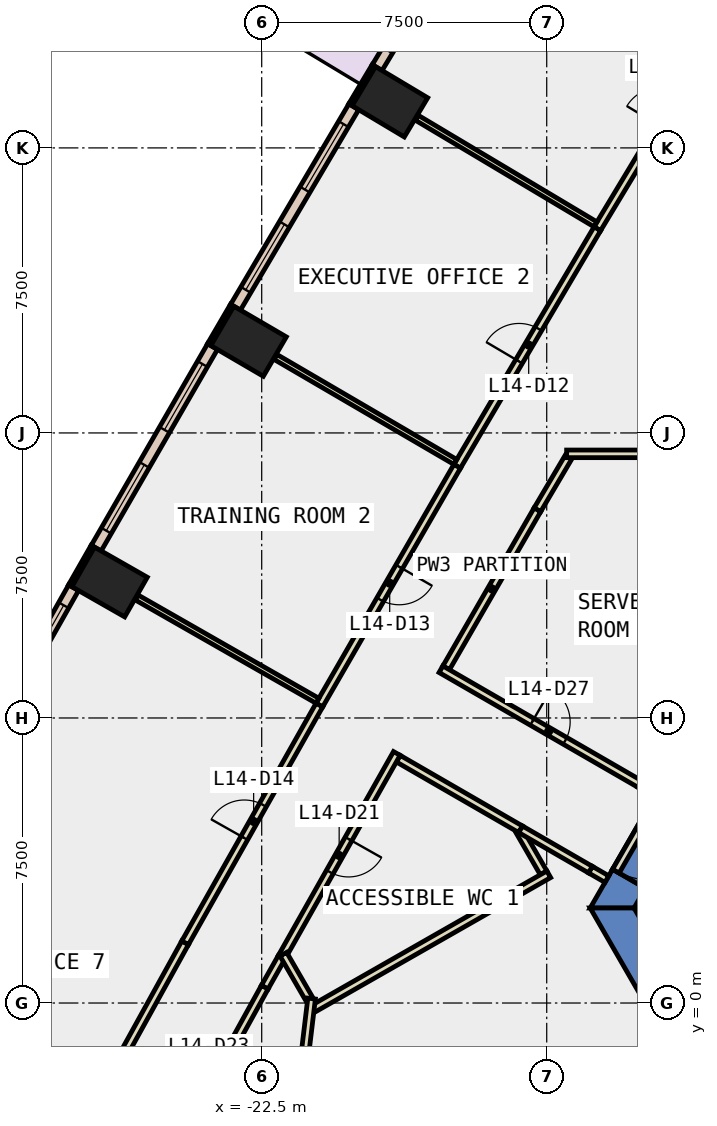
"""IFC4 building model, lengths in metres.
Left out: names, types, materials, properties, quantities, classifications, styles, units other than length and angle.
Written with IfcOpenShell. Run it as: python <this file> out.ifc"""

import sys

from ifc_helpers import new_model, si_unit, direction, frame, frame_2d, origin, origin_2d, place, context, subcontext, project, spatial, polyline, rectangle, outline, extrude, element, fill, save


model = new_model("IFC4")
c1 = context("Model", 3, precision=1e-05, world=origin(), true_north=direction((0.0, 1.0)))
c2 = subcontext(c1, "Body", "Model", "MODEL_VIEW")
j1 = project(units=[si_unit("LENGTHUNIT", "METRE"), si_unit("PLANEANGLEUNIT", "RADIAN")], contexts=[c1])
p1 = place(None, origin())
s1 = spatial("IfcSite", under=j1, at=p1, CompositionType="ELEMENT")
p2 = place(p1, origin())
s2 = spatial("IfcBuilding", under=s1, at=p2, CompositionType="ELEMENT")
p3 = place(p2, frame((0.0, 0.0, 68.6)))
s3 = spatial("IfcBuildingStorey", under=s2, at=p3, CompositionType="ELEMENT", Elevation=68.6)
for number, where, z_axis, x_axis in (
    (1, (-19.127, 23.714, -0.4), (0.0, 0.0, 1.0), (0.513, 0.858, 0.0)),
    (2, (-22.846, 17.413, -0.4), (0.0, 0.0, 1.0), (0.504, 0.864, 0.0)),
    (3, (-26.503, 11.078, -0.4), (0.0, 0.0, 1.0), (0.496, 0.869, 0.0)),
):
    element("IfcColumn", number, at=place(p3, frame(where, z_axis=z_axis, x_axis=x_axis)), inside=s3, PredefinedType="COLUMN", context=c2, shape_type="SweptSolid", body=[
        extrude(rectangle(XDim=1.2, YDim=1.6, at=origin_2d()), origin(), (0.0, 0.0, 1.0), 4.2),
    ])
p4 = place(p3, frame((0.0, 0.0, -0.4)))
e4 = element("IfcWall", 4, at=p4, inside=s3, PredefinedType="SHEAR", context=c2, shape_type="SweptSolid", body=[
    extrude(outline(polyline([(-12.402, 3.02), (-13.267, 3.52), (-13.856, 2.5), (-12.702, 2.5), (-12.402, 3.02)])), origin(), (0.0, 0.0, 1.0), 4.2),
])
p5 = place(p3, frame((0.0, 0.0, 3.6)))
e5 = element("IfcWall", 5, at=p5, inside=s3, PredefinedType="SHEAR", context=c2, shape_type="SweptSolid", body=[
    extrude(outline(polyline([(-13.267, 3.52), (-12.402, 3.02), (-11.402, 4.752), (-12.267, 5.252), (-13.267, 3.52)])), origin(), (0.0, 0.0, 1.0), 0.2),
])
p6 = place(p3, frame((0.0, 0.0, -0.4)))
e6 = element("IfcWall", 6, at=p6, inside=s3, PredefinedType="SHEAR", context=c2, shape_type="SweptSolid", body=[
    extrude(outline(polyline([(-13.856, 2.5), (-6.928, -9.5), (-6.351, -8.5), (-12.702, 2.5), (-13.856, 2.5)])), origin(), (0.0, 0.0, 1.0), 4.2),
])
p7 = place(p3, frame((-19.549, 24.665, 0.0), z_axis=(0.0, 0.0, 1.0), x_axis=(-0.513238760752, -0.858245870635, 0.0)))
e7 = element("IfcWall", 7, at=p7, inside=s3, PredefinedType="STANDARD", context=c2, shape_type="SweptSolid", body=[
    extrude(rectangle(XDim=1.2, YDim=0.1, at=frame_2d((0.6, 0.0))), origin(), (0.0, 0.0, 1.0), 3.8),
])
p8 = place(p3, frame((-23.277, 18.36, 0.0), z_axis=(0.0, 0.0, 1.0), x_axis=(-0.504225229382, -0.863572184623, 0.0)))
e8 = element("IfcWall", 8, at=p8, inside=s3, PredefinedType="STANDARD", context=c2, shape_type="SweptSolid", body=[
    extrude(rectangle(XDim=1.2, YDim=0.1, at=frame_2d((0.6, 0.0))), origin(), (0.0, 0.0, 1.0), 3.8),
])
p9 = place(p3, frame((-26.944, 12.02, 0.0), z_axis=(0.0, 0.0, 1.0), x_axis=(-0.495854054996, -0.868405870629, 0.0)))
e9 = element("IfcWall", 9, at=p9, inside=s3, PredefinedType="STANDARD", context=c2, shape_type="SweptSolid", body=[
    extrude(rectangle(XDim=1.2, YDim=0.1, at=frame_2d((0.6, 0.0))), origin(), (0.0, 0.0, 1.0), 3.8),
])
p10 = place(p3, frame((-16.3, 29.859, 0.0), z_axis=(0.0, 0.0, 1.0), x_axis=(-0.516147563478, -0.856499674674, 0.0)))
e10 = element("IfcWall", 10, at=p10, inside=s3, PredefinedType="STANDARD", context=c2, shape_type="SweptSolid", body=[
    extrude(rectangle(XDim=6.126, YDim=0.3, at=frame_2d((3.063, 0.0))), origin(), (0.0, 0.0, 1.0), 3.8),
])
p11 = place(p10, frame((0.532, 0.0, 0.0)))
e11 = element("IfcOpeningElement", 11, at=p11, cuts=e10, PredefinedType="OPENING", context=c2, shape_type="SweptSolid", body=[
    extrude(rectangle(XDim=2.0, YDim=2.4, at=frame_2d((1.0, 1.2))), frame((0.0, 0.16, 0.0), z_axis=(0.0, -1.0, 0.0), x_axis=(1.0, 0.0, 0.0)), (0.0, 0.0, 1.0), 0.32),
])
p12 = place(p10, frame((3.595, 0.0, 0.9)))
e12 = element("IfcOpeningElement", 12, at=p12, cuts=e10, PredefinedType="OPENING", context=c2, shape_type="SweptSolid", body=[
    extrude(rectangle(XDim=2.0, YDim=2.6, at=frame_2d((1.0, 1.3))), frame((0.0, 0.16, 0.0), z_axis=(0.0, -1.0, 0.0), x_axis=(1.0, 0.0, 0.0)), (0.0, 0.0, 1.0), 0.32),
])
p13 = place(p3, frame((-20.076, 23.583, 0.0), z_axis=(0.0, 0.0, 1.0), x_axis=(-0.508163938648, -0.861260362177, 0.0)))
e13 = element("IfcWall", 13, at=p13, inside=s3, PredefinedType="STANDARD", context=c2, shape_type="SweptSolid", body=[
    extrude(rectangle(XDim=6.126, YDim=0.3, at=frame_2d((3.063, 0.0))), origin(), (0.0, 0.0, 1.0), 3.8),
])
p14 = place(p13, frame((0.531, 0.0, 0.9)))
e14 = element("IfcOpeningElement", 14, at=p14, cuts=e13, PredefinedType="OPENING", context=c2, shape_type="SweptSolid", body=[
    extrude(rectangle(XDim=2.0, YDim=2.6, at=frame_2d((1.0, 1.3))), frame((0.0, 0.16, 0.0), z_axis=(0.0, -1.0, 0.0), x_axis=(1.0, 0.0, 0.0)), (0.0, 0.0, 1.0), 0.32),
])
p15 = place(p13, frame((3.594, 0.0, 0.9)))
e15 = element("IfcOpeningElement", 15, at=p15, cuts=e13, PredefinedType="OPENING", context=c2, shape_type="SweptSolid", body=[
    extrude(rectangle(XDim=2.0, YDim=2.6, at=frame_2d((1.0, 1.3))), frame((0.0, 0.16, 0.0), z_axis=(0.0, -1.0, 0.0), x_axis=(1.0, 0.0, 0.0)), (0.0, 0.0, 1.0), 0.32),
])
p16 = place(p3, frame((-23.793, 17.273, 0.0), z_axis=(0.0, 0.0, 1.0), x_axis=(-0.499903021601, -0.86608138705, 0.0)))
e16 = element("IfcWall", 16, at=p16, inside=s3, PredefinedType="STANDARD", context=c2, shape_type="SweptSolid", body=[
    extrude(rectangle(XDim=6.125, YDim=0.3, at=frame_2d((3.062, 0.0))), origin(), (0.0, 0.0, 1.0), 3.8),
])
p17 = place(p16, frame((0.531, 0.0, 0.9)))
e17 = element("IfcOpeningElement", 17, at=p17, cuts=e16, PredefinedType="OPENING", context=c2, shape_type="SweptSolid", body=[
    extrude(rectangle(XDim=2.0, YDim=2.6, at=frame_2d((1.0, 1.3))), frame((0.0, 0.16, 0.0), z_axis=(0.0, -1.0, 0.0), x_axis=(1.0, 0.0, 0.0)), (0.0, 0.0, 1.0), 0.32),
])
p18 = place(p16, frame((3.594, 0.0, 0.9)))
e18 = element("IfcOpeningElement", 18, at=p18, cuts=e16, PredefinedType="OPENING", context=c2, shape_type="SweptSolid", body=[
    extrude(rectangle(XDim=2.0, YDim=2.6, at=frame_2d((1.0, 1.3))), frame((0.0, 0.16, 0.0), z_axis=(0.0, -1.0, 0.0), x_axis=(1.0, 0.0, 0.0)), (0.0, 0.0, 1.0), 0.32),
])
p19 = place(p3, frame((-27.449, 10.928, 0.0), z_axis=(0.0, 0.0, 1.0), x_axis=(-0.491887822214, -0.870658584267, 0.0)))
e19 = element("IfcWall", 19, at=p19, inside=s3, PredefinedType="STANDARD", context=c2, shape_type="SweptSolid", body=[
    extrude(rectangle(XDim=6.125, YDim=0.3, at=frame_2d((3.062, 0.0))), origin(), (0.0, 0.0, 1.0), 3.8),
])
p20 = place(p19, frame((0.531, 0.0, 0.9)))
e20 = element("IfcOpeningElement", 20, at=p20, cuts=e19, PredefinedType="OPENING", context=c2, shape_type="SweptSolid", body=[
    extrude(rectangle(XDim=2.0, YDim=2.6, at=frame_2d((1.0, 1.3))), frame((0.0, 0.16, 0.0), z_axis=(0.0, -1.0, 0.0), x_axis=(1.0, 0.0, 0.0)), (0.0, 0.0, 1.0), 0.32),
])
p21 = place(p19, frame((3.594, 0.0, 0.9)))
e21 = element("IfcOpeningElement", 21, at=p21, cuts=e19, PredefinedType="OPENING", context=c2, shape_type="SweptSolid", body=[
    extrude(rectangle(XDim=2.0, YDim=2.6, at=frame_2d((1.0, 1.3))), frame((0.0, 0.16, 0.0), z_axis=(0.0, -1.0, 0.0), x_axis=(1.0, 0.0, 0.0)), (0.0, 0.0, 1.0), 0.32),
])
p22 = place(p3, frame((-14.427, 14.364, 0.0), z_axis=(0.0, 0.0, 1.0), x_axis=(-0.508509719672, -0.861056249614, 0.0)))
e22 = element("IfcWall", 22, at=p22, inside=s3, PredefinedType="PARTITIONING", context=c2, shape_type="SweptSolid", body=[
    extrude(rectangle(XDim=1.611, YDim=0.2, at=frame_2d((0.805, 0.0))), origin(), (0.0, 0.0, 1.0), 3.8),
])
p23 = place(p3, frame((-15.246, 12.977, 0.0), z_axis=(0.0, 0.0, 1.0), x_axis=(-0.499891203561, -0.866088208327, 0.0)))
e23 = element("IfcWall", 23, at=p23, inside=s3, PredefinedType="PARTITIONING", context=c2, shape_type="SweptSolid", body=[
    extrude(rectangle(XDim=4.801, YDim=0.2, at=frame_2d((2.4, 0.0))), origin(), (0.0, 0.0, 1.0), 3.8),
])
p24 = place(p3, frame((-17.783, 8.783, 0.0), z_axis=(0.0, 0.0, 1.0), x_axis=(0.866041598752, -0.499971948444, 0.0)))
e24 = element("IfcWall", 24, at=p24, inside=s3, PredefinedType="PARTITIONING", context=c2, shape_type="SweptSolid", body=[
    extrude(rectangle(XDim=6.042, YDim=0.2, at=frame_2d((3.021, 0.0))), origin(), (0.0, 0.0, 1.0), 3.8),
])
p25 = place(p24, frame((2.771, 0.0, 0.0)))
e25 = element("IfcOpeningElement", 25, at=p25, cuts=e24, PredefinedType="OPENING", context=c2, shape_type="SweptSolid", body=[
    extrude(rectangle(XDim=1.0, YDim=2.1, at=frame_2d((0.5, 1.05))), frame((0.0, 0.11, 0.0), z_axis=(0.0, -1.0, 0.0), x_axis=(1.0, 0.0, 0.0)), (0.0, 0.0, 1.0), 0.22),
])
p26 = place(p3, frame((-15.687, 4.571, 0.0), z_axis=(0.0, 0.0, 1.0), x_axis=(-0.866044530317, 0.49996687041, 0.0)))
e26 = element("IfcWall", 26, at=p26, inside=s3, PredefinedType="PARTITIONING", context=c2, shape_type="SweptSolid", body=[
    extrude(rectangle(XDim=3.718, YDim=0.2, at=frame_2d((1.859, 0.0))), origin(), (0.0, 0.0, 1.0), 3.8),
])
p27 = place(p3, frame((-18.945, 6.567, 0.0), z_axis=(0.0, 0.0, 1.0), x_axis=(-0.491840751019, -0.87068517596, 0.0)))
e27 = element("IfcWall", 27, at=p27, inside=s3, PredefinedType="PARTITIONING", context=c2, shape_type="SweptSolid", body=[
    extrude(rectangle(XDim=6.168, YDim=0.2, at=frame_2d((3.084, 0.0))), origin(), (0.0, 0.0, 1.0), 3.8),
])
p28 = place(p27, frame((2.584, 0.0, 0.0)))
e28 = element("IfcOpeningElement", 28, at=p28, cuts=e27, PredefinedType="OPENING", context=c2, shape_type="SweptSolid", body=[
    extrude(rectangle(XDim=1.0, YDim=2.1, at=frame_2d((0.5, 1.05))), frame((0.0, 0.11, 0.0), z_axis=(0.0, -1.0, 0.0), x_axis=(1.0, 0.0, 0.0)), (0.0, 0.0, 1.0), 0.22),
])
p29 = place(p3, frame((-13.417, 3.26, 0.0), z_axis=(0.0, 0.0, 1.0), x_axis=(-0.866071776036, 0.499919672301, 0.0)))
e29 = element("IfcWall", 29, at=p29, inside=s3, PredefinedType="PARTITIONING", context=c2, shape_type="SweptSolid", body=[
    extrude(rectangle(XDim=0.5, YDim=0.2, at=frame_2d((0.25, 0.0))), origin(), (0.0, 0.0, 1.0), 2.4),
])
p30 = place(p3, frame((-21.979, 1.196, 0.0), z_axis=(0.0, 0.0, 1.0), x_axis=(-0.491617674369, -0.870811151886, 0.0)))
e30 = element("IfcWall", 30, at=p30, inside=s3, PredefinedType="PARTITIONING", context=c2, shape_type="SweptSolid", body=[
    extrude(rectangle(XDim=0.897, YDim=0.2, at=frame_2d((0.448, 0.0))), origin(), (0.0, 0.0, 1.0), 3.8),
])
p31 = place(p3, frame((-22.42, 0.415, 0.0), z_axis=(0.0, 0.0, 1.0), x_axis=(-0.483559496818, -0.875311494861, 0.0)))
e31 = element("IfcWall", 31, at=p31, inside=s3, PredefinedType="PARTITIONING", context=c2, shape_type="SweptSolid", body=[
    extrude(rectangle(XDim=6.103, YDim=0.2, at=frame_2d((3.052, 0.0))), origin(), (0.0, 0.0, 1.0), 3.8),
])
p32 = place(p31, frame((2.552, 0.0, 0.0)))
e32 = element("IfcOpeningElement", 32, at=p32, cuts=e31, PredefinedType="OPENING", context=c2, shape_type="SweptSolid", body=[
    extrude(rectangle(XDim=1.0, YDim=2.1, at=frame_2d((0.5, 1.05))), frame((0.0, 0.11, 0.0), z_axis=(0.0, -1.0, 0.0), x_axis=(1.0, 0.0, 0.0)), (0.0, 0.0, 1.0), 0.22),
])
p33 = place(p3, frame((-13.669, 20.373, 0.0), z_axis=(0.0, 0.0, 1.0), x_axis=(0.516247820136, 0.85643924957, 0.0)))
e33 = element("IfcWall", 33, at=p33, inside=s3, PredefinedType="PARTITIONING", context=c2, shape_type="SweptSolid", body=[
    extrude(rectangle(XDim=7.332, YDim=0.2, at=frame_2d((3.666, 0.0))), origin(), (0.0, 0.0, 1.0), 3.8),
])
p34 = place(p33, frame((3.166, 0.0, 0.0)))
e34 = element("IfcOpeningElement", 34, at=p34, cuts=e33, PredefinedType="OPENING", context=c2, shape_type="SweptSolid", body=[
    extrude(rectangle(XDim=1.0, YDim=2.1, at=frame_2d((0.5, 1.05))), frame((0.0, 0.11, 0.0), z_axis=(0.0, -1.0, 0.0), x_axis=(1.0, 0.0, 0.0)), (0.0, 0.0, 1.0), 0.22),
])
p35 = place(p3, frame((-17.357, 14.122, 0.0), z_axis=(0.0, 0.0, 1.0), x_axis=(0.508298575594, 0.861180909014, 0.0)))
e35 = element("IfcWall", 35, at=p35, inside=s3, PredefinedType="PARTITIONING", context=c2, shape_type="SweptSolid", body=[
    extrude(rectangle(XDim=7.258, YDim=0.2, at=frame_2d((3.629, 0.0))), origin(), (0.0, 0.0, 1.0), 3.8),
])
p36 = place(p35, frame((3.204, 0.0, 0.0)))
e36 = element("IfcOpeningElement", 36, at=p36, cuts=e35, PredefinedType="OPENING", context=c2, shape_type="SweptSolid", body=[
    extrude(rectangle(XDim=1.0, YDim=2.1, at=frame_2d((0.5, 1.05))), frame((0.0, 0.11, 0.0), z_axis=(0.0, -1.0, 0.0), x_axis=(1.0, 0.0, 0.0)), (0.0, 0.0, 1.0), 0.22),
])
p37 = place(p3, frame((-17.356, 14.122, 0.0), z_axis=(0.0, 0.0, 1.0), x_axis=(-0.499946764175, -0.866056137321, 0.0)))
e37 = element("IfcWall", 37, at=p37, inside=s3, PredefinedType="PARTITIONING", context=c2, shape_type="SweptSolid", body=[
    extrude(rectangle(XDim=7.255, YDim=0.2, at=frame_2d((3.627, 0.0))), origin(), (0.0, 0.0, 1.0), 3.8),
])
p38 = place(p37, frame((3.052, 0.0, 0.0)))
e38 = element("IfcOpeningElement", 38, at=p38, cuts=e37, PredefinedType="OPENING", context=c2, shape_type="SweptSolid", body=[
    extrude(rectangle(XDim=1.0, YDim=2.1, at=frame_2d((0.5, 1.05))), frame((0.0, 0.11, 0.0), z_axis=(0.0, -1.0, 0.0), x_axis=(1.0, 0.0, 0.0)), (0.0, 0.0, 1.0), 0.22),
])
p39 = place(p3, frame((-28.06, -4.831, 0.0), z_axis=(0.0, 0.0, 1.0), x_axis=(0.483631054848, 0.875271959328, 0.0)))
e39 = element("IfcWall", 39, at=p39, inside=s3, PredefinedType="PARTITIONING", context=c2, shape_type="SweptSolid", body=[
    extrude(rectangle(XDim=7.33, YDim=0.2, at=frame_2d((3.665, 0.0))), origin(), (0.0, 0.0, 1.0), 3.8),
])
p40 = place(p3, frame((-24.515, 1.585, 0.0), z_axis=(0.0, 0.0, 1.0), x_axis=(0.49174361417, 0.870740040381, 0.0)))
e40 = element("IfcWall", 40, at=p40, inside=s3, PredefinedType="PARTITIONING", context=c2, shape_type="SweptSolid", body=[
    extrude(rectangle(XDim=7.183, YDim=0.2, at=frame_2d((3.591, 0.0))), origin(), (0.0, 0.0, 1.0), 3.8),
])
p41 = place(p40, frame((3.166, 0.0, 0.0)))
e41 = element("IfcOpeningElement", 41, at=p41, cuts=e40, PredefinedType="OPENING", context=c2, shape_type="SweptSolid", body=[
    extrude(rectangle(XDim=1.0, YDim=2.1, at=frame_2d((0.5, 1.05))), frame((0.0, 0.11, 0.0), z_axis=(0.0, -1.0, 0.0), x_axis=(1.0, 0.0, 0.0)), (0.0, 0.0, 1.0), 0.22),
])
p42 = place(p3, frame((-6.957, 14.45, 0.0), z_axis=(0.0, 0.0, 1.0), x_axis=(-1.0, 0.0, 0.0)))
e42 = element("IfcWall", 42, at=p42, inside=s3, PredefinedType="PARTITIONING", context=c2, shape_type="SweptSolid", body=[
    extrude(rectangle(XDim=7.519, YDim=0.2, at=frame_2d((3.76, 0.0))), origin(), (0.0, 0.0, 1.0), 3.8),
])
p43 = place(p3, frame((-15.724, 4.534, 0.0), z_axis=(0.0, 0.0, 1.0), x_axis=(0.500195085719, -0.865912741691, 0.0)))
e43 = element("IfcWall", 43, at=p43, inside=s3, PredefinedType="PARTITIONING", context=c2, shape_type="SweptSolid", body=[
    extrude(rectangle(XDim=1.282, YDim=0.2, at=frame_2d((0.641, 0.0))), origin(), (0.0, 0.0, 1.0), 3.8),
])
p44 = place(p3, frame((-14.946, 3.387, 0.0), z_axis=(0.0, 0.0, 1.0), x_axis=(-0.868556003823, -0.4955910292, 0.0)))
e44 = element("IfcWall", 44, at=p44, inside=s3, PredefinedType="PARTITIONING", context=c2, shape_type="SweptSolid", body=[
    extrude(rectangle(XDim=7.199, YDim=0.2, at=frame_2d((3.6, 0.0))), origin(), (0.0, 0.0, 1.0), 3.8),
])
p45 = place(p3, frame((-21.249, 0.105, 0.0), z_axis=(0.0, 0.0, 1.0), x_axis=(-0.500442009317, 0.865770059144, 0.0)))
e45 = element("IfcWall", 45, at=p45, inside=s3, PredefinedType="PARTITIONING", context=c2, shape_type="SweptSolid", body=[
    extrude(rectangle(XDim=1.361, YDim=0.2, at=frame_2d((0.68, 0.0))), origin(), (0.0, 0.0, 1.0), 3.8),
])
p46 = place(p3, frame((-22.403, -10.017, 0.0), z_axis=(0.0, 0.0, 1.0), x_axis=(0.119143334217, 0.992877064853, 0.0)))
e46 = element("IfcWall", 46, at=p46, inside=s3, PredefinedType="PARTITIONING", context=c2, shape_type="SweptSolid", body=[
    extrude(rectangle(XDim=10.207, YDim=0.2, at=frame_2d((5.104, 0.0))), origin(), (0.0, 0.0, 1.0), 3.8),
])
p47 = place(p3, frame((-13.716, 20.488, 0.0), z_axis=(0.0, 0.0, 1.0), x_axis=(-0.85883841868, 0.512246591594, 0.0)))
e47 = element("IfcWall", 47, at=p47, inside=s3, PredefinedType="PARTITIONING", context=c2, shape_type="SweptSolid", body=[
    extrude(rectangle(XDim=5.479, YDim=0.15, at=frame_2d((2.74, 0.0))), origin(), (0.0, 0.0, 1.0), 3.8),
])
p48 = place(p3, frame((-17.405, 14.237, 0.0), z_axis=(0.0, 0.0, 1.0), x_axis=(-0.863614048932, 0.504153522736, 0.0)))
e48 = element("IfcWall", 48, at=p48, inside=s3, PredefinedType="PARTITIONING", context=c2, shape_type="SweptSolid", body=[
    extrude(rectangle(XDim=5.48, YDim=0.15, at=frame_2d((2.74, 0.0))), origin(), (0.0, 0.0, 1.0), 3.8),
])
p49 = place(p3, frame((-21.033, 7.953, 0.0), z_axis=(0.0, 0.0, 1.0), x_axis=(-0.868311678357, 0.496018980715, 0.0)))
e49 = element("IfcWall", 49, at=p49, inside=s3, PredefinedType="PARTITIONING", context=c2, shape_type="SweptSolid", body=[
    extrude(rectangle(XDim=5.48, YDim=0.15, at=frame_2d((2.74, 0.0))), origin(), (0.0, 0.0, 1.0), 3.8),
])
p50 = place(p3, frame((-12.18, 5.202, 0.0), z_axis=(0.0, 0.0, 1.0), x_axis=(-0.50002537861, -0.866010750942, 0.0)))
e50 = element("IfcWall", 50, at=p50, inside=s3, PredefinedType="PARTITIONING", context=c2, shape_type="SweptSolid", body=[
    extrude(rectangle(XDim=2.0, YDim=0.2, at=frame_2d((1.0, 0.0))), origin(), (0.0, 0.0, 1.0), 2.4),
])
p51 = place(p50, frame((0.19, 0.0, 0.0)))
e51 = element("IfcOpeningElement", 51, at=p51, cuts=e50, PredefinedType="OPENING", context=c2, shape_type="SweptSolid", body=[
    extrude(rectangle(XDim=1.8, YDim=2.1, at=frame_2d((0.9, 1.05))), frame((0.0, 0.11, 0.0), z_axis=(0.0, -1.0, 0.0), x_axis=(1.0, 0.0, 0.0)), (0.0, 0.0, 1.0), 0.22),
])
p52 = place(p3, frame((-13.85, 3.51, 0.0), z_axis=(0.0, 0.0, 1.0), x_axis=(-0.865924890849, 0.500174053114, 0.0)))
e52 = element("IfcWall", 52, at=p52, inside=s3, PredefinedType="PARTITIONING", context=c2, shape_type="SweptSolid", body=[
    extrude(rectangle(XDim=2.121, YDim=0.2, at=frame_2d((1.061, 0.0))), origin(), (0.0, 0.0, 1.0), 3.8),
])
p53 = place(p14, origin())
e53 = element("IfcWindow", 53, at=p53, inside=s3, PartitioningType="SINGLE_PANEL", PredefinedType="WINDOW", context=c2, shape_type="SweptSolid", body=[
    extrude(rectangle(XDim=2.0, YDim=2.6, at=frame_2d((1.0, 1.3))), frame((0.0, 0.03, 0.0), z_axis=(0.0, -1.0, 0.0), x_axis=(1.0, 0.0, 0.0)), (0.0, 0.0, 1.0), 0.06),
])
fill(e14, e53)
p54 = place(p15, origin())
e54 = element("IfcWindow", 54, at=p54, inside=s3, PartitioningType="SINGLE_PANEL", PredefinedType="WINDOW", context=c2, shape_type="SweptSolid", body=[
    extrude(rectangle(XDim=2.0, YDim=2.6, at=frame_2d((1.0, 1.3))), frame((0.0, 0.03, 0.0), z_axis=(0.0, -1.0, 0.0), x_axis=(1.0, 0.0, 0.0)), (0.0, 0.0, 1.0), 0.06),
])
fill(e15, e54)
p55 = place(p17, origin())
e55 = element("IfcWindow", 55, at=p55, inside=s3, PartitioningType="SINGLE_PANEL", PredefinedType="WINDOW", context=c2, shape_type="SweptSolid", body=[
    extrude(rectangle(XDim=2.0, YDim=2.6, at=frame_2d((1.0, 1.3))), frame((0.0, 0.03, 0.0), z_axis=(0.0, -1.0, 0.0), x_axis=(1.0, 0.0, 0.0)), (0.0, 0.0, 1.0), 0.06),
])
fill(e17, e55)
p56 = place(p18, origin())
e56 = element("IfcWindow", 56, at=p56, inside=s3, PartitioningType="SINGLE_PANEL", PredefinedType="WINDOW", context=c2, shape_type="SweptSolid", body=[
    extrude(rectangle(XDim=2.0, YDim=2.6, at=frame_2d((1.0, 1.3))), frame((0.0, 0.03, 0.0), z_axis=(0.0, -1.0, 0.0), x_axis=(1.0, 0.0, 0.0)), (0.0, 0.0, 1.0), 0.06),
])
fill(e18, e56)
p57 = place(p20, origin())
e57 = element("IfcWindow", 57, at=p57, inside=s3, PartitioningType="SINGLE_PANEL", PredefinedType="WINDOW", context=c2, shape_type="SweptSolid", body=[
    extrude(rectangle(XDim=2.0, YDim=2.6, at=frame_2d((1.0, 1.3))), frame((0.0, 0.03, 0.0), z_axis=(0.0, -1.0, 0.0), x_axis=(1.0, 0.0, 0.0)), (0.0, 0.0, 1.0), 0.06),
])
fill(e20, e57)
p58 = place(p36, origin())
e58 = element("IfcDoor", 58, at=p58, inside=s3, OperationType="SINGLE_SWING_RIGHT", PredefinedType="DOOR", context=c2, shape_type="SweptSolid", body=[
    extrude(rectangle(XDim=1.0, YDim=2.1, at=frame_2d((0.5, 1.05))), frame((0.0, 0.025, 0.0), z_axis=(0.0, -1.0, 0.0), x_axis=(1.0, 0.0, 0.0)), (0.0, 0.0, 1.0), 0.05),
])
fill(e36, e58)
p59 = place(p38, origin())
e59 = element("IfcDoor", 59, at=p59, inside=s3, OperationType="SINGLE_SWING_RIGHT", PredefinedType="DOOR", context=c2, shape_type="SweptSolid", body=[
    extrude(rectangle(XDim=1.0, YDim=2.1, at=frame_2d((0.5, 1.05))), frame((0.0, 0.025, 0.0), z_axis=(0.0, -1.0, 0.0), x_axis=(1.0, 0.0, 0.0)), (0.0, 0.0, 1.0), 0.05),
])
fill(e38, e59)
p60 = place(p41, origin())
e60 = element("IfcDoor", 60, at=p60, inside=s3, OperationType="SINGLE_SWING_RIGHT", PredefinedType="DOOR", context=c2, shape_type="SweptSolid", body=[
    extrude(rectangle(XDim=1.0, YDim=2.1, at=frame_2d((0.5, 1.05))), frame((0.0, 0.025, 0.0), z_axis=(0.0, -1.0, 0.0), x_axis=(1.0, 0.0, 0.0)), (0.0, 0.0, 1.0), 0.05),
])
fill(e41, e60)
p61 = place(p28, origin())
e61 = element("IfcDoor", 61, at=p61, inside=s3, OperationType="SINGLE_SWING_LEFT", PredefinedType="DOOR", context=c2, shape_type="SweptSolid", body=[
    extrude(rectangle(XDim=1.0, YDim=2.1, at=frame_2d((0.5, 1.05))), frame((0.0, 0.025, 0.0), z_axis=(0.0, -1.0, 0.0), x_axis=(1.0, 0.0, 0.0)), (0.0, 0.0, 1.0), 0.05),
])
fill(e28, e61)
p62 = place(p25, origin())
e62 = element("IfcDoor", 62, at=p62, inside=s3, OperationType="SINGLE_SWING_LEFT", PredefinedType="DOOR", context=c2, shape_type="SweptSolid", body=[
    extrude(rectangle(XDim=1.0, YDim=2.1, at=frame_2d((0.5, 1.05))), frame((0.0, 0.025, 0.0), z_axis=(0.0, -1.0, 0.0), x_axis=(1.0, 0.0, 0.0)), (0.0, 0.0, 1.0), 0.05),
])
fill(e25, e62)
p63 = place(p51, origin())
e63 = element("IfcDoor", 63, at=p63, inside=s3, OperationType="DOUBLE_DOOR_SINGLE_SWING", PredefinedType="DOOR", context=c2, shape_type="SweptSolid", body=[
    extrude(rectangle(XDim=1.8, YDim=2.1, at=frame_2d((0.9, 1.05))), frame((0.0, 0.025, 0.0), z_axis=(0.0, -1.0, 0.0), x_axis=(1.0, 0.0, 0.0)), (0.0, 0.0, 1.0), 0.05),
])
fill(e51, e63)
save(model, sys.argv[1])
